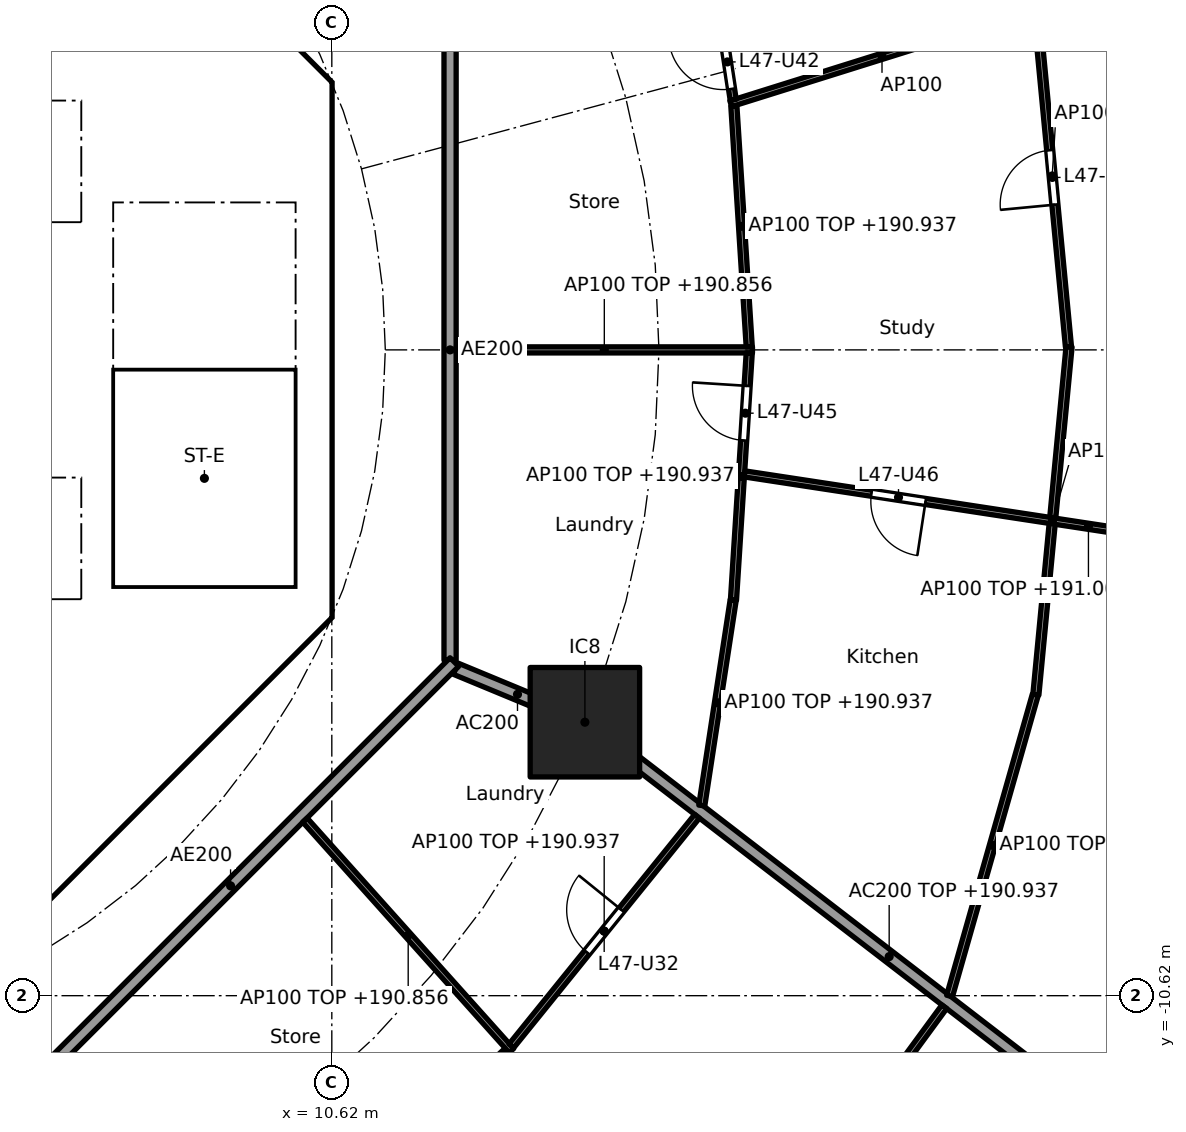
"""IFC4 building model, lengths in metres.
Left out: names, types, materials, properties, quantities, classifications, styles, units other than length and angle.
Written with IfcOpenShell. Run it as: python <this file> out.ifc"""

import sys

from ifc_helpers import new_model, si_unit, direction, frame, frame_2d, origin, origin_2d, place, context, subcontext, project, spatial, polyline, rectangle, outline, extrude, element, fill, save


model = new_model("IFC4")
c1 = context("Model", 3, precision=1e-05, world=origin(), true_north=direction((0.0, 1.0)))
c2 = subcontext(c1, "Body", "Model", "MODEL_VIEW")
j1 = project(units=[si_unit("LENGTHUNIT", "METRE"), si_unit("PLANEANGLEUNIT", "RADIAN")], contexts=[c1])
p1 = place(None, origin())
s1 = spatial("IfcSite", under=j1, at=p1, CompositionType="ELEMENT")
p2 = place(p1, origin())
s2 = spatial("IfcBuilding", under=s1, at=p2, CompositionType="ELEMENT")
p3 = place(p2, frame((0.0, 0.0, 188.1)))
s3 = spatial("IfcBuildingStorey", under=s2, at=p3, CompositionType="ELEMENT", Elevation=188.1)
p4 = place(p3, frame((14.782, -6.123, 0.0), z_axis=(0.0, 0.0, 1.0), x_axis=(1.0, 0.0, 0.0)))
e1 = element("IfcColumn", 1, at=p4, inside=s3, PredefinedType="COLUMN", context=c2, shape_type="SweptSolid", body=[
    extrude(rectangle(XDim=1.8, YDim=1.8, at=origin_2d()), origin(), (0.0, 0.0, 1.0), 3.7),
])
p5 = place(p3, frame((9.988, 4.613, 0.0), z_axis=(0.0, 0.0, 1.0), x_axis=(-0.707106781187, 0.707106781187, 0.0)))
e2 = element("IfcWall", 2, at=p5, inside=s3, PredefinedType="SHEAR", context=c2, shape_type="SweptSolid", body=[
    extrude(rectangle(XDim=7.602, YDim=0.6, at=frame_2d((3.801, 0.0))), origin(), (0.0, 0.0, 1.0), 3.44),
])
p6 = place(p5, frame((3.201, 0.0, 0.0)))
e3 = element("IfcOpeningElement", 3, at=p6, cuts=e2, PredefinedType="OPENING", context=c2, shape_type="SweptSolid", body=[
    extrude(rectangle(XDim=1.2, YDim=2.1, at=frame_2d((0.6, 1.05))), frame((0.0, 0.31, 0.0), z_axis=(0.0, -1.0, 0.0), x_axis=(1.0, 0.0, 0.0)), (0.0, 0.0, 1.0), 0.62),
])
p7 = place(p3, frame((4.613, -9.988, 0.0), z_axis=(0.0, 0.0, 1.0), x_axis=(0.707106781187, 0.707106781187, 0.0)))
e4 = element("IfcWall", 4, at=p7, inside=s3, PredefinedType="SHEAR", context=c2, shape_type="SweptSolid", body=[
    extrude(rectangle(XDim=7.602, YDim=0.6, at=frame_2d((3.801, 0.0))), origin(), (0.0, 0.0, 1.0), 3.44),
])
p8 = place(p7, frame((3.201, 0.0, 0.0)))
e5 = element("IfcOpeningElement", 5, at=p8, cuts=e4, PredefinedType="OPENING", context=c2, shape_type="SweptSolid", body=[
    extrude(rectangle(XDim=1.2, YDim=2.1, at=frame_2d((0.6, 1.05))), frame((0.0, 0.31, 0.0), z_axis=(0.0, -1.0, 0.0), x_axis=(1.0, 0.0, 0.0)), (0.0, 0.0, 1.0), 0.62),
])
p9 = place(p3, frame((-6.7, 2.0, 0.0), z_axis=(0.0, 0.0, 1.0), x_axis=(1.0, 0.0, 0.0)))
e6 = element("IfcWall", 6, at=p9, inside=s3, PredefinedType="SOLIDWALL", context=c2, shape_type="SweptSolid", body=[
    extrude(rectangle(XDim=13.4, YDim=0.2, at=frame_2d((6.7, 0.0))), origin(), (0.0, 0.0, 1.0), 3.44),
])
p10 = place(p9, frame((7.25, 0.0, 0.0)))
e7 = element("IfcOpeningElement", 7, at=p10, cuts=e6, PredefinedType="OPENING", context=c2, shape_type="SweptSolid", body=[
    extrude(rectangle(XDim=1.1, YDim=2.1, at=frame_2d((0.55, 1.05))), frame((0.0, 0.11, 0.0), z_axis=(0.0, -1.0, 0.0), x_axis=(1.0, 0.0, 0.0)), (0.0, 0.0, 1.0), 0.22),
])
p11 = place(p9, frame((9.45, 0.0, 0.0)))
e8 = element("IfcOpeningElement", 8, at=p11, cuts=e6, PredefinedType="OPENING", context=c2, shape_type="SweptSolid", body=[
    extrude(rectangle(XDim=1.1, YDim=2.1, at=frame_2d((0.55, 1.05))), frame((0.0, 0.11, 0.0), z_axis=(0.0, -1.0, 0.0), x_axis=(1.0, 0.0, 0.0)), (0.0, 0.0, 1.0), 0.22),
])
p12 = place(p9, frame((1.85, 0.0, 0.0)))
e9 = element("IfcOpeningElement", 9, at=p12, cuts=e6, PredefinedType="OPENING", context=c2, shape_type="SweptSolid", body=[
    extrude(rectangle(XDim=0.9, YDim=2.1, at=frame_2d((0.45, 1.05))), frame((0.0, 0.11, 0.0), z_axis=(0.0, -1.0, 0.0), x_axis=(1.0, 0.0, 0.0)), (0.0, 0.0, 1.0), 0.22),
])
p13 = place(p9, frame((5.15, 0.0, 0.0)))
e10 = element("IfcOpeningElement", 10, at=p13, cuts=e6, PredefinedType="OPENING", context=c2, shape_type="SweptSolid", body=[
    extrude(rectangle(XDim=0.9, YDim=2.1, at=frame_2d((0.45, 1.05))), frame((0.0, 0.11, 0.0), z_axis=(0.0, -1.0, 0.0), x_axis=(1.0, 0.0, 0.0)), (0.0, 0.0, 1.0), 0.22),
])
p14 = place(p3, frame((6.7, 4.0, 0.0), z_axis=(0.0, 0.0, 1.0), x_axis=(1.0, 0.0, 0.0)))
e11 = element("IfcWall", 11, at=p14, inside=s3, PredefinedType="SOLIDWALL", context=c2, shape_type="SweptSolid", body=[
    extrude(rectangle(XDim=3.325, YDim=0.2, at=frame_2d((1.662, 0.0))), origin(), (0.0, 0.0, 1.0), 3.44),
])
p15 = place(p14, frame((1.25, 0.0, 0.0)))
e12 = element("IfcOpeningElement", 12, at=p15, cuts=e11, PredefinedType="OPENING", context=c2, shape_type="SweptSolid", body=[
    extrude(rectangle(XDim=1.1, YDim=2.1, at=frame_2d((0.55, 1.05))), frame((0.0, 0.11, 0.0), z_axis=(0.0, -1.0, 0.0), x_axis=(1.0, 0.0, 0.0)), (0.0, 0.0, 1.0), 0.22),
])
p16 = place(p3, frame((-6.7, -2.0, 0.0), z_axis=(0.0, 0.0, 1.0), x_axis=(1.0, 0.0, 0.0)))
e13 = element("IfcWall", 13, at=p16, inside=s3, PredefinedType="SOLIDWALL", context=c2, shape_type="SweptSolid", body=[
    extrude(rectangle(XDim=13.4, YDim=0.2, at=frame_2d((6.7, 0.0))), origin(), (0.0, 0.0, 1.0), 3.44),
])
p17 = place(p16, frame((5.05, 0.0, 0.0)))
e14 = element("IfcOpeningElement", 14, at=p17, cuts=e13, PredefinedType="OPENING", context=c2, shape_type="SweptSolid", body=[
    extrude(rectangle(XDim=1.1, YDim=2.1, at=frame_2d((0.55, 1.05))), frame((0.0, 0.11, 0.0), z_axis=(0.0, -1.0, 0.0), x_axis=(1.0, 0.0, 0.0)), (0.0, 0.0, 1.0), 0.22),
])
p18 = place(p16, frame((7.25, 0.0, 0.0)))
e15 = element("IfcOpeningElement", 15, at=p18, cuts=e13, PredefinedType="OPENING", context=c2, shape_type="SweptSolid", body=[
    extrude(rectangle(XDim=1.1, YDim=2.1, at=frame_2d((0.55, 1.05))), frame((0.0, 0.11, 0.0), z_axis=(0.0, -1.0, 0.0), x_axis=(1.0, 0.0, 0.0)), (0.0, 0.0, 1.0), 0.22),
])
p19 = place(p16, frame((1.85, 0.0, 0.0)))
e16 = element("IfcOpeningElement", 16, at=p19, cuts=e13, PredefinedType="OPENING", context=c2, shape_type="SweptSolid", body=[
    extrude(rectangle(XDim=0.9, YDim=2.1, at=frame_2d((0.45, 1.05))), frame((0.0, 0.11, 0.0), z_axis=(0.0, -1.0, 0.0), x_axis=(1.0, 0.0, 0.0)), (0.0, 0.0, 1.0), 0.22),
])
p20 = place(p3, origin())
e17 = element("IfcWall", 17, at=p20, inside=s3, PredefinedType="SHEAR", context=c2, shape_type="SweptSolid", body=[
    extrude(outline(polyline([(9.776, -4.401), (10.025, -4.152), (10.025, -3.801), (10.025, 4.152), (9.776, 4.401), (10.2, 4.825), (10.625, 4.401), (10.625, -4.401), (10.2, -4.825), (9.776, -4.401)])), origin(), (0.0, 0.0, 1.0), 3.44),
])
p21 = place(p3, origin())
e18 = element("IfcWall", 18, at=p21, inside=s3, PredefinedType="SOLIDWALL", context=c2, shape_type="SweptSolid", body=[
    extrude(outline(polyline([(-6.7, -2.1), (-6.5, -2.1), (-6.5, -4.1), (-2.3, -4.1), (-2.3, -2.1), (-2.1, -2.1), (-2.1, -4.1), (-0.1, -4.1), (-0.1, -2.1), (0.1, -2.1), (0.1, -4.1), (2.1, -4.1), (2.1, -2.1), (2.3, -2.1), (2.3, -4.1), (4.3, -4.1), (4.3, -2.1), (4.5, -2.1), (4.5, -4.1), (6.5, -4.1), (6.5, -2.1), (6.7, -2.1), (6.7, -4.3), (-6.7, -4.3), (-6.7, -2.1)])), origin(), (0.0, 0.0, 1.0), 3.44),
])
p22 = place(p3, origin())
e19 = element("IfcWall", 19, at=p22, inside=s3, PredefinedType="SOLIDWALL", context=c2, shape_type="SweptSolid", body=[
    extrude(outline(polyline([(-6.7, 4.3), (6.7, 4.3), (6.7, 2.1), (6.5, 2.1), (6.5, 4.1), (4.5, 4.1), (4.5, 2.1), (4.3, 2.1), (4.3, 4.1), (2.3, 4.1), (2.3, 2.1), (2.1, 2.1), (2.1, 4.1), (0.1, 4.1), (0.1, 2.1), (-0.1, 2.1), (-0.1, 4.1), (-2.1, 4.1), (-2.1, 2.1), (-2.3, 2.1), (-2.3, 4.1), (-6.5, 4.1), (-6.5, 2.1), (-6.7, 2.1), (-6.7, 4.3)])), origin(), (0.0, 0.0, 1.0), 3.44),
])
p23 = place(p3, origin())
e20 = element("IfcWall", 20, at=p23, inside=s3, PredefinedType="SOLIDWALL", context=c2, shape_type="SweptSolid", body=[
    extrude(outline(polyline([(7.025, -3.9), (6.7, -3.9), (6.7, 3.9), (7.025, 3.9), (7.025, -3.9)])), origin(), (0.0, 0.0, 1.0), 3.44),
])
p24 = place(p3, origin())
e21 = element("IfcWall", 21, at=p24, inside=s3, PredefinedType="SOLIDWALL", context=c2, shape_type="SweptSolid", body=[
    extrude(outline(polyline([(10.025, -4.1), (6.7, -4.1), (6.7, -3.9), (10.025, -3.9), (10.025, -4.1)])), origin(), (0.0, 0.0, 1.0), 3.44),
])
p25 = place(p3, frame((12.657, -5.243, 0.0), z_axis=(0.0, 0.0, 1.0), x_axis=(0.92383017907, -0.382802560388, 0.0)))
e22 = element("IfcWall", 22, at=p25, inside=s3, PredefinedType="PARTITIONING", context=c2, shape_type="SweptSolid", body=[
    extrude(rectangle(XDim=2.2, YDim=0.2, at=frame_2d((1.1, 0.0))), origin(), (0.0, 0.0, 1.0), 3.44),
])
p26 = place(p3, frame((14.822, -6.154, 0.0), z_axis=(0.0, 0.0, 1.0), x_axis=(0.792203056092, -0.610257583254, 0.0)))
e23 = element("IfcWall", 23, at=p26, inside=s3, PredefinedType="PARTITIONING", context=c2, shape_type="SweptSolid", body=[
    extrude(rectangle(XDim=12.533, YDim=0.2, at=frame_2d((6.266, 0.0))), origin(), (0.0, 0.0, 1.0), 2.837),
])
p27 = place(p3, frame((12.565, -5.104, 0.0), z_axis=(0.0, 0.0, 1.0), x_axis=(0.0, 1.0, 0.0)))
e24 = element("IfcWall", 24, at=p27, inside=s3, PredefinedType="PARTITIONING", context=c2, shape_type="SweptSolid", body=[
    extrude(rectangle(XDim=10.209, YDim=0.2, at=frame_2d((5.104, 0.0))), origin(), (0.0, 0.0, 1.0), 3.44),
])
p28 = place(p3, frame((5.275, -12.494, 0.0), z_axis=(0.0, 0.0, 1.0), x_axis=(0.707106781187, 0.707106781187, 0.0)))
e25 = element("IfcWall", 25, at=p28, inside=s3, PredefinedType="PARTITIONING", context=c2, shape_type="SweptSolid", body=[
    extrude(rectangle(XDim=10.409, YDim=0.2, at=frame_2d((5.205, 0.0))), origin(), (0.0, 0.0, 1.0), 3.44),
])
p29 = place(p3, frame((12.665, 0.0, 0.0), z_axis=(0.0, 0.0, 1.0), x_axis=(1.0, 0.0, 0.0)))
e26 = element("IfcWall", 26, at=p29, inside=s3, PredefinedType="PARTITIONING", context=c2, shape_type="SweptSolid", body=[
    extrude(rectangle(XDim=4.873, YDim=0.1, at=frame_2d((2.437, 0.0))), origin(), (0.0, 0.0, 1.0), 2.756),
])
p30 = place(p3, frame((17.485, 0.05, 0.0), z_axis=(0.0, 0.0, 1.0), x_axis=(-0.063679314345, 0.99797041285, 0.0)))
e27 = element("IfcWall", 27, at=p30, inside=s3, PredefinedType="PARTITIONING", context=c2, shape_type="SweptSolid", body=[
    extrude(rectangle(XDim=3.972, YDim=0.1, at=frame_2d((1.986, 0.0))), origin(), (0.0, 0.0, 1.0), 2.837),
])
p31 = place(p3, frame((17.485, -0.05, 0.0), z_axis=(0.0, 0.0, 1.0), x_axis=(-0.063673473968, -0.997970785501, 0.0)))
e28 = element("IfcWall", 28, at=p31, inside=s3, PredefinedType="PARTITIONING", context=c2, shape_type="SweptSolid", body=[
    extrude(rectangle(XDim=4.072, YDim=0.1, at=frame_2d((2.036, 0.0))), origin(), (0.0, 0.0, 1.0), 2.837),
])
p32 = place(p31, frame((0.543, 0.0, 0.0)))
e29 = element("IfcOpeningElement", 29, at=p32, cuts=e28, PredefinedType="OPENING", context=c2, shape_type="SweptSolid", body=[
    extrude(rectangle(XDim=0.9, YDim=2.1, at=frame_2d((0.45, 1.05))), frame((0.0, 0.06, 0.0), z_axis=(0.0, -1.0, 0.0), x_axis=(1.0, 0.0, 0.0)), (0.0, 0.0, 1.0), 0.12),
])
p33 = place(p3, frame((22.734, 0.05, 0.0), z_axis=(0.0, 0.0, 1.0), x_axis=(-0.0949274088, 0.995484197292, 0.0)))
e30 = element("IfcWall", 30, at=p33, inside=s3, PredefinedType="PARTITIONING", context=c2, shape_type="SweptSolid", body=[
    extrude(rectangle(XDim=5.648, YDim=0.1, at=frame_2d((2.824, 0.0))), origin(), (0.0, 0.0, 1.0), 2.837),
])
p34 = place(p33, frame((2.349, 0.0, 0.0)))
e31 = element("IfcOpeningElement", 31, at=p34, cuts=e30, PredefinedType="OPENING", context=c2, shape_type="SweptSolid", body=[
    extrude(rectangle(XDim=0.9, YDim=2.1, at=frame_2d((0.45, 1.05))), frame((0.0, 0.06, 0.0), z_axis=(0.0, -1.0, 0.0), x_axis=(1.0, 0.0, 0.0)), (0.0, 0.0, 1.0), 0.12),
])
p35 = place(p3, frame((22.744, 0.05, 0.0), z_axis=(0.0, 0.0, 1.0), x_axis=(-0.094931362305, -0.995483820286, 0.0)))
e32 = element("IfcWall", 32, at=p35, inside=s3, PredefinedType="PARTITIONING", context=c2, shape_type="SweptSolid", body=[
    extrude(rectangle(XDim=5.748, YDim=0.1, at=frame_2d((2.874, 0.0))), origin(), (0.0, 0.0, 1.0), 2.837),
])
p36 = place(p3, frame((17.181, 4.049, 0.0), z_axis=(0.0, 0.0, 1.0), x_axis=(0.954246359918, 0.299021545351, 0.0)))
e33 = element("IfcWall", 33, at=p36, inside=s3, PredefinedType="PARTITIONING", context=c2, shape_type="SweptSolid", body=[
    extrude(rectangle(XDim=5.213, YDim=0.1, at=frame_2d((2.606, 0.0))), origin(), (0.0, 0.0, 1.0), 3.44),
])
p37 = place(p3, frame((17.221, 4.113, 0.0), z_axis=(0.0, 0.0, 1.0), x_axis=(-0.151078880423, 0.988521710379, 0.0)))
e34 = element("IfcWall", 34, at=p37, inside=s3, PredefinedType="PARTITIONING", context=c2, shape_type="SweptSolid", body=[
    extrude(rectangle(XDim=3.469, YDim=0.1, at=frame_2d((1.735, 0.0))), origin(), (0.0, 0.0, 1.0), 2.837),
])
p38 = place(p37, frame((0.18, 0.0, 0.0)))
e35 = element("IfcOpeningElement", 35, at=p38, cuts=e34, PredefinedType="OPENING", context=c2, shape_type="SweptSolid", body=[
    extrude(rectangle(XDim=0.9, YDim=2.1, at=frame_2d((0.45, 1.05))), frame((0.0, 0.06, 0.0), z_axis=(0.0, -1.0, 0.0), x_axis=(1.0, 0.0, 0.0)), (0.0, 0.0, 1.0), 0.12),
])
p39 = place(p3, frame((10.21, -14.614, 0.0), z_axis=(0.0, 0.0, 1.0), x_axis=(0.728883199496, 0.684638066055, 0.0)))
e36 = element("IfcWall", 36, at=p39, inside=s3, PredefinedType="PARTITIONING", context=c2, shape_type="SweptSolid", body=[
    extrude(rectangle(XDim=4.519, YDim=0.1, at=frame_2d((2.26, 0.0))), origin(), (0.0, 0.0, 1.0), 2.837),
])
p40 = place(p39, frame((2.964, 0.0, 0.0)))
e37 = element("IfcOpeningElement", 37, at=p40, cuts=e36, PredefinedType="OPENING", context=c2, shape_type="SweptSolid", body=[
    extrude(rectangle(XDim=0.9, YDim=2.1, at=frame_2d((0.45, 1.05))), frame((0.0, 0.06, 0.0), z_axis=(0.0, -1.0, 0.0), x_axis=(1.0, 0.0, 0.0)), (0.0, 0.0, 1.0), 0.12),
])
p41 = place(p3, frame((10.178, -7.732, 0.0), z_axis=(0.0, 0.0, 1.0), x_axis=(0.667285466359, -0.744802058527, 0.0)))
e38 = element("IfcWall", 38, at=p41, inside=s3, PredefinedType="PARTITIONING", context=c2, shape_type="SweptSolid", body=[
    extrude(rectangle(XDim=5.09, YDim=0.1, at=frame_2d((2.545, 0.0))), origin(), (0.0, 0.0, 1.0), 2.756),
])
p42 = place(p3, frame((13.572, -11.447, 0.0), z_axis=(0.0, 0.0, 1.0), x_axis=(0.628738316533, 0.777616955399, 0.0)))
e39 = element("IfcWall", 39, at=p42, inside=s3, PredefinedType="PARTITIONING", context=c2, shape_type="SweptSolid", body=[
    extrude(rectangle(XDim=4.857, YDim=0.1, at=frame_2d((2.429, 0.0))), origin(), (0.0, 0.0, 1.0), 2.837),
])
p43 = place(p42, frame((1.979, 0.0, 0.0)))
e40 = element("IfcOpeningElement", 40, at=p43, cuts=e39, PredefinedType="OPENING", context=c2, shape_type="SweptSolid", body=[
    extrude(rectangle(XDim=0.9, YDim=2.1, at=frame_2d((0.45, 1.05))), frame((0.0, 0.06, 0.0), z_axis=(0.0, -1.0, 0.0), x_axis=(1.0, 0.0, 0.0)), (0.0, 0.0, 1.0), 0.12),
])
p44 = place(p3, frame((17.229, -15.529, 0.0), z_axis=(0.0, 0.0, 1.0), x_axis=(0.591110768293, 0.806590391468, 0.0)))
e41 = element("IfcWall", 41, at=p44, inside=s3, PredefinedType="PARTITIONING", context=c2, shape_type="SweptSolid", body=[
    extrude(rectangle(XDim=5.86, YDim=0.1, at=frame_2d((2.93, 0.0))), origin(), (0.0, 0.0, 1.0), 2.837),
])
p45 = place(p3, frame((16.704, -7.493, 0.0), z_axis=(0.0, 0.0, 1.0), x_axis=(0.1510806336, 0.988521442434, 0.0)))
e42 = element("IfcWall", 42, at=p45, inside=s3, PredefinedType="PARTITIONING", context=c2, shape_type="SweptSolid", body=[
    extrude(rectangle(XDim=3.419, YDim=0.1, at=frame_2d((1.71, 0.0))), origin(), (0.0, 0.0, 1.0), 2.837),
])
p46 = place(p3, frame((20.779, -10.625, 0.0), z_axis=(0.0, 0.0, 1.0), x_axis=(0.273819702124, 0.961781040949, 0.0)))
e43 = element("IfcWall", 43, at=p46, inside=s3, PredefinedType="PARTITIONING", context=c2, shape_type="SweptSolid", body=[
    extrude(rectangle(XDim=5.152, YDim=0.1, at=frame_2d((2.576, 0.0))), origin(), (0.0, 0.0, 1.0), 2.837),
])
p47 = place(p3, frame((17.407, -2.039, 0.0), z_axis=(0.0, 0.0, 1.0), x_axis=(0.98858728603, -0.150649188184, 0.0)))
e44 = element("IfcWall", 44, at=p47, inside=s3, PredefinedType="PARTITIONING", context=c2, shape_type="SweptSolid", body=[
    extrude(rectangle(XDim=11.441, YDim=0.1, at=frame_2d((5.721, 0.0))), origin(), (0.0, 0.0, 1.0), 2.905),
])
p48 = place(p47, frame((7.832, 0.0, 0.0)))
e45 = element("IfcOpeningElement", 45, at=p48, cuts=e44, PredefinedType="OPENING", context=c2, shape_type="SweptSolid", body=[
    extrude(rectangle(XDim=0.9, YDim=2.1, at=frame_2d((0.45, 1.05))), frame((0.0, 0.06, 0.0), z_axis=(0.0, -1.0, 0.0), x_axis=(1.0, 0.0, 0.0)), (0.0, 0.0, 1.0), 0.12),
])
p49 = place(p47, frame((2.111, 0.0, 0.0)))
e46 = element("IfcOpeningElement", 46, at=p49, cuts=e44, PredefinedType="OPENING", context=c2, shape_type="SweptSolid", body=[
    extrude(rectangle(XDim=0.9, YDim=2.1, at=frame_2d((0.45, 1.05))), frame((0.0, 0.06, 0.0), z_axis=(0.0, -1.0, 0.0), x_axis=(1.0, 0.0, 0.0)), (0.0, 0.0, 1.0), 0.12),
])
p50 = place(p15, frame((1.1, 0.0, 0.0), x_axis=(-1.0, 0.0, 0.0)))
e47 = element("IfcDoor", 47, at=p50, inside=s3, OperationType="SINGLE_SWING_LEFT", PredefinedType="DOOR", context=c2, shape_type="SweptSolid", body=[
    extrude(rectangle(XDim=1.1, YDim=2.1, at=frame_2d((0.55, 1.05))), frame((0.0, 0.025, 0.0), z_axis=(0.0, -1.0, 0.0), x_axis=(1.0, 0.0, 0.0)), (0.0, 0.0, 1.0), 0.05),
])
fill(e12, e47)
p51 = place(p8, origin())
e48 = element("IfcDoor", 48, at=p51, inside=s3, OperationType="SINGLE_SWING_RIGHT", PredefinedType="DOOR", context=c2, shape_type="SweptSolid", body=[
    extrude(rectangle(XDim=1.2, YDim=2.1, at=frame_2d((0.6, 1.05))), frame((0.0, 0.025, 0.0), z_axis=(0.0, -1.0, 0.0), x_axis=(1.0, 0.0, 0.0)), (0.0, 0.0, 1.0), 0.05),
])
fill(e5, e48)
p52 = place(p43, origin())
e49 = element("IfcDoor", 49, at=p52, inside=s3, OperationType="SINGLE_SWING_RIGHT", PredefinedType="DOOR", context=c2, shape_type="SweptSolid", body=[
    extrude(rectangle(XDim=0.9, YDim=2.1, at=frame_2d((0.45, 1.05))), frame((0.0, 0.025, 0.0), z_axis=(0.0, -1.0, 0.0), x_axis=(1.0, 0.0, 0.0)), (0.0, 0.0, 1.0), 0.05),
])
fill(e40, e49)
p53 = place(p38, origin())
e50 = element("IfcDoor", 50, at=p53, inside=s3, OperationType="SINGLE_SWING_RIGHT", PredefinedType="DOOR", context=c2, shape_type="SweptSolid", body=[
    extrude(rectangle(XDim=0.9, YDim=2.1, at=frame_2d((0.45, 1.05))), frame((0.0, 0.025, 0.0), z_axis=(0.0, -1.0, 0.0), x_axis=(1.0, 0.0, 0.0)), (0.0, 0.0, 1.0), 0.05),
])
fill(e35, e50)
p54 = place(p34, origin())
e51 = element("IfcDoor", 51, at=p54, inside=s3, OperationType="SINGLE_SWING_LEFT", PredefinedType="DOOR", context=c2, shape_type="SweptSolid", body=[
    extrude(rectangle(XDim=0.9, YDim=2.1, at=frame_2d((0.45, 1.05))), frame((0.0, 0.025, 0.0), z_axis=(0.0, -1.0, 0.0), x_axis=(1.0, 0.0, 0.0)), (0.0, 0.0, 1.0), 0.05),
])
fill(e31, e51)
p55 = place(p32, frame((0.9, 0.0, 0.0), x_axis=(-1.0, 0.0, 0.0)))
e52 = element("IfcDoor", 52, at=p55, inside=s3, OperationType="SINGLE_SWING_RIGHT", PredefinedType="DOOR", context=c2, shape_type="SweptSolid", body=[
    extrude(rectangle(XDim=0.9, YDim=2.1, at=frame_2d((0.45, 1.05))), frame((0.0, 0.025, 0.0), z_axis=(0.0, -1.0, 0.0), x_axis=(1.0, 0.0, 0.0)), (0.0, 0.0, 1.0), 0.05),
])
fill(e29, e52)
p56 = place(p49, frame((0.9, 0.0, 0.0), x_axis=(-1.0, 0.0, 0.0)))
e53 = element("IfcDoor", 53, at=p56, inside=s3, OperationType="SINGLE_SWING_LEFT", PredefinedType="DOOR", context=c2, shape_type="SweptSolid", body=[
    extrude(rectangle(XDim=0.9, YDim=2.1, at=frame_2d((0.45, 1.05))), frame((0.0, 0.025, 0.0), z_axis=(0.0, -1.0, 0.0), x_axis=(1.0, 0.0, 0.0)), (0.0, 0.0, 1.0), 0.05),
])
fill(e46, e53)
save(model, sys.argv[1])
